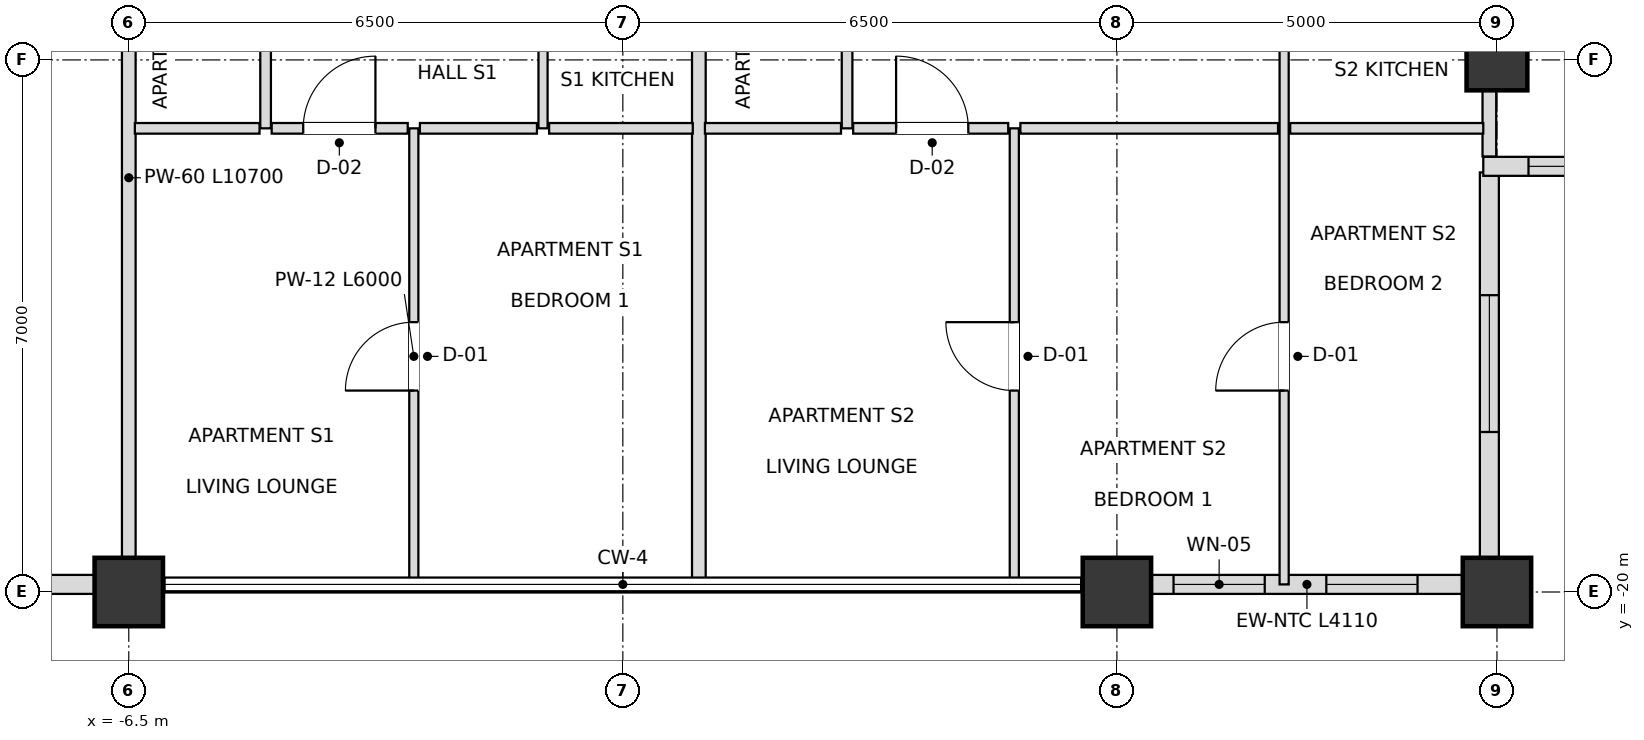
"""IFC4 building model, lengths in metres.
Left out: names, types, materials, properties, quantities, classifications, styles, units other than length and angle.
Written with IfcOpenShell. Run it as: python <this file> out.ifc"""

import sys

from ifc_helpers import new_model, si_unit, direction, frame, frame_2d, origin, origin_2d, place, context, subcontext, project, spatial, rectangle, extrude, element, fill, save


model = new_model("IFC4")
c1 = context("Model", 3, precision=1e-05, world=origin(), true_north=direction((0.0, 1.0)))
c2 = subcontext(c1, "Body", "Model", "MODEL_VIEW")
j1 = project(units=[si_unit("LENGTHUNIT", "METRE"), si_unit("PLANEANGLEUNIT", "RADIAN")], contexts=[c1])
p1 = place(None, origin())
s1 = spatial("IfcSite", under=j1, at=p1, CompositionType="ELEMENT")
p2 = place(p1, origin())
s2 = spatial("IfcBuilding", under=s1, at=p2, CompositionType="ELEMENT")
p3 = place(p2, frame((0.0, 0.0, 297.9)))
s3 = spatial("IfcBuildingStorey", under=s2, at=p3, CompositionType="ELEMENT", Elevation=297.9)
for number, where, z_axis, x_axis in (
    (1, (-6.5, -20.0, 0.0), (0.0, 0.0, 1.0), (1.0, 0.0, 0.0)),
    (2, (6.5, -20.0, 0.0), (0.0, 0.0, 1.0), (1.0, 0.0, 0.0)),
    (3, (11.5, -20.0, 0.0), (0.0, 0.0, 1.0), (1.0, 0.0, 0.0)),
):
    element("IfcColumn", number, at=place(p3, frame(where, z_axis=z_axis, x_axis=x_axis)), inside=s3, PredefinedType="USERDEFINED", context=c2, shape_type="SweptSolid", body=[
        extrude(rectangle(XDim=0.9, YDim=0.9, at=origin_2d()), origin(), (0.0, 0.0, 1.0), 3.6),
    ])
p4 = place(p3, frame((11.5, -13.0, 0.0), z_axis=(0.0, 0.0, 1.0), x_axis=(1.0, 0.0, 0.0)))
e4 = element("IfcColumn", 4, at=p4, inside=s3, PredefinedType="COLUMN", context=c2, shape_type="SweptSolid", body=[
    extrude(rectangle(XDim=0.8, YDim=0.8, at=origin_2d()), origin(), (0.0, 0.0, 1.0), 3.6),
])
p5 = place(p3, frame((-11.055, -19.9, 0.0), z_axis=(0.0, 0.0, 1.0), x_axis=(1.0, 0.0, 0.0)))
e5 = element("IfcWall", 5, at=p5, inside=s3, PredefinedType="SOLIDWALL", context=c2, shape_type="SweptSolid", body=[
    extrude(rectangle(XDim=4.11, YDim=0.25, at=frame_2d((2.055, 0.0))), origin(), (0.0, 0.0, 1.0), 2.748),
])
p6 = place(p5, frame((1.155, 0.0, 0.72)))
e6 = element("IfcOpeningElement", 6, at=p6, cuts=e5, PredefinedType="OPENING", context=c2, shape_type="SweptSolid", body=[
    extrude(rectangle(XDim=1.8, YDim=1.68, at=frame_2d((0.9, 0.84))), frame((0.0, 0.135, 0.0), z_axis=(0.0, -1.0, 0.0), x_axis=(1.0, 0.0, 0.0)), (0.0, 0.0, 1.0), 0.27),
])
p7 = place(p3, frame((6.945, -19.9, 0.0), z_axis=(0.0, 0.0, 1.0), x_axis=(1.0, 0.0, 0.0)))
e7 = element("IfcWall", 7, at=p7, inside=s3, PredefinedType="SOLIDWALL", context=c2, shape_type="SweptSolid", body=[
    extrude(rectangle(XDim=4.11, YDim=0.25, at=frame_2d((2.055, 0.0))), origin(), (0.0, 0.0, 1.0), 2.748),
])
p8 = place(p7, frame((0.3, 0.0, 0.72)))
e8 = element("IfcOpeningElement", 8, at=p8, cuts=e7, PredefinedType="OPENING", context=c2, shape_type="SweptSolid", body=[
    extrude(rectangle(XDim=1.2, YDim=1.68, at=frame_2d((0.6, 0.84))), frame((0.0, 0.135, 0.0), z_axis=(0.0, -1.0, 0.0), x_axis=(1.0, 0.0, 0.0)), (0.0, 0.0, 1.0), 0.27),
])
p9 = place(p7, frame((2.31, 0.0, 0.72)))
e9 = element("IfcOpeningElement", 9, at=p9, cuts=e7, PredefinedType="OPENING", context=c2, shape_type="SweptSolid", body=[
    extrude(rectangle(XDim=1.2, YDim=1.68, at=frame_2d((0.6, 0.84))), frame((0.0, 0.135, 0.0), z_axis=(0.0, -1.0, 0.0), x_axis=(1.0, 0.0, 0.0)), (0.0, 0.0, 1.0), 0.27),
])
p10 = place(p3, frame((11.4, -19.82, 0.0), z_axis=(0.0, 0.0, 1.0), x_axis=(0.0, 1.0, 0.0)))
e10 = element("IfcWall", 10, at=p10, inside=s3, PredefinedType="SOLIDWALL", context=c2, shape_type="SweptSolid", body=[
    extrude(rectangle(XDim=5.34, YDim=0.25, at=frame_2d((2.67, 0.0))), origin(), (0.0, 0.0, 1.0), 2.748),
])
p11 = place(p10, frame((1.925, 0.0, 0.72)))
e11 = element("IfcOpeningElement", 11, at=p11, cuts=e10, PredefinedType="OPENING", context=c2, shape_type="SweptSolid", body=[
    extrude(rectangle(XDim=1.8, YDim=1.68, at=frame_2d((0.9, 0.84))), frame((0.0, 0.135, 0.0), z_axis=(0.0, -1.0, 0.0), x_axis=(1.0, 0.0, 0.0)), (0.0, 0.0, 1.0), 0.27),
])
p12 = place(p3, frame((11.32, -14.4, 0.0), z_axis=(0.0, 0.0, 1.0), x_axis=(1.0, 0.0, 0.0)))
e12 = element("IfcWall", 12, at=p12, inside=s3, PredefinedType="SOLIDWALL", context=c2, shape_type="SweptSolid", body=[
    extrude(rectangle(XDim=5.66, YDim=0.25, at=frame_2d((2.83, 0.0))), origin(), (0.0, 0.0, 1.0), 2.748),
])
p13 = place(p12, frame((0.595, 0.0, 0.72)))
e13 = element("IfcOpeningElement", 13, at=p13, cuts=e12, PredefinedType="OPENING", context=c2, shape_type="SweptSolid", body=[
    extrude(rectangle(XDim=1.8, YDim=1.68, at=frame_2d((0.9, 0.84))), frame((0.0, 0.135, 0.0), z_axis=(0.0, -1.0, 0.0), x_axis=(1.0, 0.0, 0.0)), (0.0, 0.0, 1.0), 0.27),
])
p14 = place(p12, frame((3.265, 0.0, 0.72)))
e14 = element("IfcOpeningElement", 14, at=p14, cuts=e12, PredefinedType="OPENING", context=c2, shape_type="SweptSolid", body=[
    extrude(rectangle(XDim=1.8, YDim=1.68, at=frame_2d((0.9, 0.84))), frame((0.0, 0.135, 0.0), z_axis=(0.0, -1.0, 0.0), x_axis=(1.0, 0.0, 0.0)), (0.0, 0.0, 1.0), 0.27),
])
p15 = place(p3, frame((-6.5, -19.9, 0.0), z_axis=(0.0, 0.0, 1.0), x_axis=(0.0, 1.0, 0.0)))
e15 = element("IfcWall", 15, at=p15, inside=s3, PredefinedType="PARTITIONING", context=c2, shape_type="SweptSolid", body=[
    extrude(rectangle(XDim=10.7, YDim=0.18, at=frame_2d((5.35, 0.0))), origin(), (0.0, 0.0, 1.0), 2.826),
])
p16 = place(p3, frame((-4.7, -13.9, 0.0), z_axis=(0.0, 0.0, 1.0), x_axis=(0.0, 1.0, 0.0)))
e16 = element("IfcWall", 16, at=p16, inside=s3, PredefinedType="PARTITIONING", context=c2, shape_type="SweptSolid", body=[
    extrude(rectangle(XDim=4.7, YDim=0.14, at=frame_2d((2.35, 0.0))), origin(), (0.0, 0.0, 1.0), 3.38),
])
p17 = place(p16, frame((1.9, 0.0, 0.0)))
e17 = element("IfcOpeningElement", 17, at=p17, cuts=e16, PredefinedType="OPENING", context=c2, shape_type="SweptSolid", body=[
    extrude(rectangle(XDim=0.9, YDim=2.1, at=frame_2d((0.45, 1.05))), frame((0.0, 0.08, 0.0), z_axis=(0.0, -1.0, 0.0), x_axis=(1.0, 0.0, 0.0)), (0.0, 0.0, 1.0), 0.16),
])
p18 = place(p3, frame((-2.75, -19.9, 0.0), z_axis=(0.0, 0.0, 1.0), x_axis=(0.0, 1.0, 0.0)))
e18 = element("IfcWall", 18, at=p18, inside=s3, PredefinedType="PARTITIONING", context=c2, shape_type="SweptSolid", body=[
    extrude(rectangle(XDim=6.0, YDim=0.12, at=frame_2d((3.0, 0.0))), origin(), (0.0, 0.0, 1.0), 3.018),
])
p19 = place(p18, frame((2.55, 0.0, 0.0)))
e19 = element("IfcOpeningElement", 19, at=p19, cuts=e18, PredefinedType="OPENING", context=c2, shape_type="SweptSolid", body=[
    extrude(rectangle(XDim=0.9, YDim=2.1, at=frame_2d((0.45, 1.05))), frame((0.0, 0.07, 0.0), z_axis=(0.0, -1.0, 0.0), x_axis=(1.0, 0.0, 0.0)), (0.0, 0.0, 1.0), 0.14),
])
p20 = place(p3, frame((-1.05, -13.9, 0.0), z_axis=(0.0, 0.0, 1.0), x_axis=(0.0, 1.0, 0.0)))
e20 = element("IfcWall", 20, at=p20, inside=s3, PredefinedType="PARTITIONING", context=c2, shape_type="SweptSolid", body=[
    extrude(rectangle(XDim=4.7, YDim=0.12, at=frame_2d((2.35, 0.0))), origin(), (0.0, 0.0, 1.0), 3.38),
])
p21 = place(p20, frame((1.875, 0.0, 0.0)))
e21 = element("IfcOpeningElement", 21, at=p21, cuts=e20, PredefinedType="OPENING", context=c2, shape_type="SweptSolid", body=[
    extrude(rectangle(XDim=0.95, YDim=2.1, at=frame_2d((0.475, 1.05))), frame((0.0, 0.07, 0.0), z_axis=(0.0, -1.0, 0.0), x_axis=(1.0, 0.0, 0.0)), (0.0, 0.0, 1.0), 0.14),
])
p22 = place(p3, frame((1.0, -19.9, 0.0), z_axis=(0.0, 0.0, 1.0), x_axis=(0.0, 1.0, 0.0)))
e22 = element("IfcWall", 22, at=p22, inside=s3, PredefinedType="PARTITIONING", context=c2, shape_type="SweptSolid", body=[
    extrude(rectangle(XDim=10.7, YDim=0.18, at=frame_2d((5.35, 0.0))), origin(), (0.0, 0.0, 1.0), 3.018),
])
p23 = place(p3, frame((2.95, -13.9, 0.0), z_axis=(0.0, 0.0, 1.0), x_axis=(0.0, 1.0, 0.0)))
e23 = element("IfcWall", 23, at=p23, inside=s3, PredefinedType="PARTITIONING", context=c2, shape_type="SweptSolid", body=[
    extrude(rectangle(XDim=4.7, YDim=0.14, at=frame_2d((2.35, 0.0))), origin(), (0.0, 0.0, 1.0), 3.38),
])
p24 = place(p23, frame((1.9, 0.0, 0.0)))
e24 = element("IfcOpeningElement", 24, at=p24, cuts=e23, PredefinedType="OPENING", context=c2, shape_type="SweptSolid", body=[
    extrude(rectangle(XDim=0.9, YDim=2.1, at=frame_2d((0.45, 1.05))), frame((0.0, 0.08, 0.0), z_axis=(0.0, -1.0, 0.0), x_axis=(1.0, 0.0, 0.0)), (0.0, 0.0, 1.0), 0.16),
])
p25 = place(p3, frame((5.15, -19.9, 0.0), z_axis=(0.0, 0.0, 1.0), x_axis=(0.0, 1.0, 0.0)))
e25 = element("IfcWall", 25, at=p25, inside=s3, PredefinedType="PARTITIONING", context=c2, shape_type="SweptSolid", body=[
    extrude(rectangle(XDim=6.0, YDim=0.12, at=frame_2d((3.0, 0.0))), origin(), (0.0, 0.0, 1.0), 3.018),
])
p26 = place(p25, frame((2.55, 0.0, 0.0)))
e26 = element("IfcOpeningElement", 26, at=p26, cuts=e25, PredefinedType="OPENING", context=c2, shape_type="SweptSolid", body=[
    extrude(rectangle(XDim=0.9, YDim=2.1, at=frame_2d((0.45, 1.05))), frame((0.0, 0.07, 0.0), z_axis=(0.0, -1.0, 0.0), x_axis=(1.0, 0.0, 0.0)), (0.0, 0.0, 1.0), 0.14),
])
p27 = place(p3, frame((8.7, -19.9, 0.0), z_axis=(0.0, 0.0, 1.0), x_axis=(0.0, 1.0, 0.0)))
e27 = element("IfcWall", 27, at=p27, inside=s3, PredefinedType="PARTITIONING", context=c2, shape_type="SweptSolid", body=[
    extrude(rectangle(XDim=10.7, YDim=0.12, at=frame_2d((5.35, 0.0))), origin(), (0.0, 0.0, 1.0), 2.826),
])
p28 = place(p27, frame((7.875, 0.0, 0.0)))
e28 = element("IfcOpeningElement", 28, at=p28, cuts=e27, PredefinedType="OPENING", context=c2, shape_type="SweptSolid", body=[
    extrude(rectangle(XDim=0.95, YDim=2.1, at=frame_2d((0.475, 1.05))), frame((0.0, 0.07, 0.0), z_axis=(0.0, -1.0, 0.0), x_axis=(1.0, 0.0, 0.0)), (0.0, 0.0, 1.0), 0.14),
])
p29 = place(p27, frame((2.55, 0.0, 0.0)))
e29 = element("IfcOpeningElement", 29, at=p29, cuts=e27, PredefinedType="OPENING", context=c2, shape_type="SweptSolid", body=[
    extrude(rectangle(XDim=0.9, YDim=2.1, at=frame_2d((0.45, 1.05))), frame((0.0, 0.07, 0.0), z_axis=(0.0, -1.0, 0.0), x_axis=(1.0, 0.0, 0.0)), (0.0, 0.0, 1.0), 0.14),
])
p30 = place(p3, frame((11.4, -14.27, 0.0), z_axis=(0.0, 0.0, 1.0), x_axis=(0.0, 1.0, 0.0)))
e30 = element("IfcWall", 30, at=p30, inside=s3, PredefinedType="PARTITIONING", context=c2, shape_type="SweptSolid", body=[
    extrude(rectangle(XDim=5.07, YDim=0.18, at=frame_2d((2.535, 0.0))), origin(), (0.0, 0.0, 1.0), 2.748),
])
p31 = place(p3, frame((-6.42, -13.9, 0.0), z_axis=(0.0, 0.0, 1.0), x_axis=(1.0, 0.0, 0.0)))
e31 = element("IfcWall", 31, at=p31, inside=s3, PredefinedType="PARTITIONING", context=c2, shape_type="SweptSolid", body=[
    extrude(rectangle(XDim=1.64, YDim=0.14, at=frame_2d((0.82, 0.0))), origin(), (0.0, 0.0, 1.0), 3.38),
])
p32 = place(p3, frame((-4.62, -13.9, 0.0), z_axis=(0.0, 0.0, 1.0), x_axis=(1.0, 0.0, 0.0)))
e32 = element("IfcWall", 32, at=p32, inside=s3, PredefinedType="PARTITIONING", context=c2, shape_type="SweptSolid", body=[
    extrude(rectangle(XDim=1.79, YDim=0.14, at=frame_2d((0.895, 0.0))), origin(), (0.0, 0.0, 1.0), 3.38),
])
p33 = place(p32, frame((0.415, 0.0, 0.0)))
e33 = element("IfcOpeningElement", 33, at=p33, cuts=e32, PredefinedType="OPENING", context=c2, shape_type="SweptSolid", body=[
    extrude(rectangle(XDim=0.95, YDim=2.1, at=frame_2d((0.475, 1.05))), frame((0.0, 0.08, 0.0), z_axis=(0.0, -1.0, 0.0), x_axis=(1.0, 0.0, 0.0)), (0.0, 0.0, 1.0), 0.16),
])
p34 = place(p3, frame((-2.67, -13.9, 0.0), z_axis=(0.0, 0.0, 1.0), x_axis=(1.0, 0.0, 0.0)))
e34 = element("IfcWall", 34, at=p34, inside=s3, PredefinedType="PARTITIONING", context=c2, shape_type="SweptSolid", body=[
    extrude(rectangle(XDim=1.54, YDim=0.14, at=frame_2d((0.77, 0.0))), origin(), (0.0, 0.0, 1.0), 3.38),
])
p35 = place(p3, frame((-0.97, -13.9, 0.0), z_axis=(0.0, 0.0, 1.0), x_axis=(1.0, 0.0, 0.0)))
e35 = element("IfcWall", 35, at=p35, inside=s3, PredefinedType="PARTITIONING", context=c2, shape_type="SweptSolid", body=[
    extrude(rectangle(XDim=1.89, YDim=0.14, at=frame_2d((0.945, 0.0))), origin(), (0.0, 0.0, 1.0), 3.38),
])
p36 = place(p3, frame((1.08, -13.9, 0.0), z_axis=(0.0, 0.0, 1.0), x_axis=(1.0, 0.0, 0.0)))
e36 = element("IfcWall", 36, at=p36, inside=s3, PredefinedType="PARTITIONING", context=c2, shape_type="SweptSolid", body=[
    extrude(rectangle(XDim=1.79, YDim=0.14, at=frame_2d((0.895, 0.0))), origin(), (0.0, 0.0, 1.0), 3.38),
])
p37 = place(p3, frame((3.03, -13.9, 0.0), z_axis=(0.0, 0.0, 1.0), x_axis=(1.0, 0.0, 0.0)))
e37 = element("IfcWall", 37, at=p37, inside=s3, PredefinedType="PARTITIONING", context=c2, shape_type="SweptSolid", body=[
    extrude(rectangle(XDim=2.04, YDim=0.14, at=frame_2d((1.02, 0.0))), origin(), (0.0, 0.0, 1.0), 3.38),
])
p38 = place(p37, frame((0.565, 0.0, 0.0)))
e38 = element("IfcOpeningElement", 38, at=p38, cuts=e37, PredefinedType="OPENING", context=c2, shape_type="SweptSolid", body=[
    extrude(rectangle(XDim=0.95, YDim=2.1, at=frame_2d((0.475, 1.05))), frame((0.0, 0.08, 0.0), z_axis=(0.0, -1.0, 0.0), x_axis=(1.0, 0.0, 0.0)), (0.0, 0.0, 1.0), 0.16),
])
p39 = place(p3, frame((5.23, -13.9, 0.0), z_axis=(0.0, 0.0, 1.0), x_axis=(1.0, 0.0, 0.0)))
e39 = element("IfcWall", 39, at=p39, inside=s3, PredefinedType="PARTITIONING", context=c2, shape_type="SweptSolid", body=[
    extrude(rectangle(XDim=3.39, YDim=0.14, at=frame_2d((1.695, 0.0))), origin(), (0.0, 0.0, 1.0), 2.826),
])
p40 = place(p3, frame((8.78, -13.9, 0.0), z_axis=(0.0, 0.0, 1.0), x_axis=(1.0, 0.0, 0.0)))
e40 = element("IfcWall", 40, at=p40, inside=s3, PredefinedType="PARTITIONING", context=c2, shape_type="SweptSolid", body=[
    extrude(rectangle(XDim=2.54, YDim=0.14, at=frame_2d((1.27, 0.0))), origin(), (0.0, 0.0, 1.0), 3.38),
])
p41 = place(p8, origin())
e41 = element("IfcWindow", 41, at=p41, inside=s3, PartitioningType="SINGLE_PANEL", PredefinedType="WINDOW", context=c2, shape_type="SweptSolid", body=[
    extrude(rectangle(XDim=1.2, YDim=1.68, at=frame_2d((0.6, 0.84))), frame((0.0, 0.03, 0.0), z_axis=(0.0, -1.0, 0.0), x_axis=(1.0, 0.0, 0.0)), (0.0, 0.0, 1.0), 0.06),
])
fill(e8, e41)
p42 = place(p9, origin())
e42 = element("IfcWindow", 42, at=p42, inside=s3, PartitioningType="SINGLE_PANEL", PredefinedType="WINDOW", context=c2, shape_type="SweptSolid", body=[
    extrude(rectangle(XDim=1.2, YDim=1.68, at=frame_2d((0.6, 0.84))), frame((0.0, 0.03, 0.0), z_axis=(0.0, -1.0, 0.0), x_axis=(1.0, 0.0, 0.0)), (0.0, 0.0, 1.0), 0.06),
])
fill(e9, e42)
p43 = place(p11, origin())
e43 = element("IfcWindow", 43, at=p43, inside=s3, PartitioningType="SINGLE_PANEL", PredefinedType="WINDOW", context=c2, shape_type="SweptSolid", body=[
    extrude(rectangle(XDim=1.8, YDim=1.68, at=frame_2d((0.9, 0.84))), frame((0.0, 0.03, 0.0), z_axis=(0.0, -1.0, 0.0), x_axis=(1.0, 0.0, 0.0)), (0.0, 0.0, 1.0), 0.06),
])
fill(e11, e43)
p44 = place(p13, origin())
e44 = element("IfcWindow", 44, at=p44, inside=s3, PartitioningType="SINGLE_PANEL", PredefinedType="WINDOW", context=c2, shape_type="SweptSolid", body=[
    extrude(rectangle(XDim=1.8, YDim=1.68, at=frame_2d((0.9, 0.84))), frame((0.0, 0.03, 0.0), z_axis=(0.0, -1.0, 0.0), x_axis=(1.0, 0.0, 0.0)), (0.0, 0.0, 1.0), 0.06),
])
fill(e13, e44)
p45 = place(p33, origin())
e45 = element("IfcDoor", 45, at=p45, inside=s3, OperationType="SINGLE_SWING_RIGHT", PredefinedType="DOOR", context=c2, shape_type="SweptSolid", body=[
    extrude(rectangle(XDim=0.95, YDim=2.1, at=frame_2d((0.475, 1.05))), frame((0.0, 0.025, 0.0), z_axis=(0.0, -1.0, 0.0), x_axis=(1.0, 0.0, 0.0)), (0.0, 0.0, 1.0), 0.05),
])
fill(e33, e45)
p46 = place(p19, origin())
e46 = element("IfcDoor", 46, at=p46, inside=s3, OperationType="SINGLE_SWING_LEFT", PredefinedType="DOOR", context=c2, shape_type="SweptSolid", body=[
    extrude(rectangle(XDim=0.9, YDim=2.1, at=frame_2d((0.45, 1.05))), frame((0.0, 0.025, 0.0), z_axis=(0.0, -1.0, 0.0), x_axis=(1.0, 0.0, 0.0)), (0.0, 0.0, 1.0), 0.05),
])
fill(e19, e46)
p47 = place(p38, origin())
e47 = element("IfcDoor", 47, at=p47, inside=s3, OperationType="SINGLE_SWING_LEFT", PredefinedType="DOOR", context=c2, shape_type="SweptSolid", body=[
    extrude(rectangle(XDim=0.95, YDim=2.1, at=frame_2d((0.475, 1.05))), frame((0.0, 0.025, 0.0), z_axis=(0.0, -1.0, 0.0), x_axis=(1.0, 0.0, 0.0)), (0.0, 0.0, 1.0), 0.05),
])
fill(e38, e47)
p48 = place(p26, origin())
e48 = element("IfcDoor", 48, at=p48, inside=s3, OperationType="SINGLE_SWING_RIGHT", PredefinedType="DOOR", context=c2, shape_type="SweptSolid", body=[
    extrude(rectangle(XDim=0.9, YDim=2.1, at=frame_2d((0.45, 1.05))), frame((0.0, 0.025, 0.0), z_axis=(0.0, -1.0, 0.0), x_axis=(1.0, 0.0, 0.0)), (0.0, 0.0, 1.0), 0.05),
])
fill(e26, e48)
p49 = place(p29, origin())
e49 = element("IfcDoor", 49, at=p49, inside=s3, OperationType="SINGLE_SWING_LEFT", PredefinedType="DOOR", context=c2, shape_type="SweptSolid", body=[
    extrude(rectangle(XDim=0.9, YDim=2.1, at=frame_2d((0.45, 1.05))), frame((0.0, 0.025, 0.0), z_axis=(0.0, -1.0, 0.0), x_axis=(1.0, 0.0, 0.0)), (0.0, 0.0, 1.0), 0.05),
])
fill(e29, e49)
save(model, sys.argv[1])
